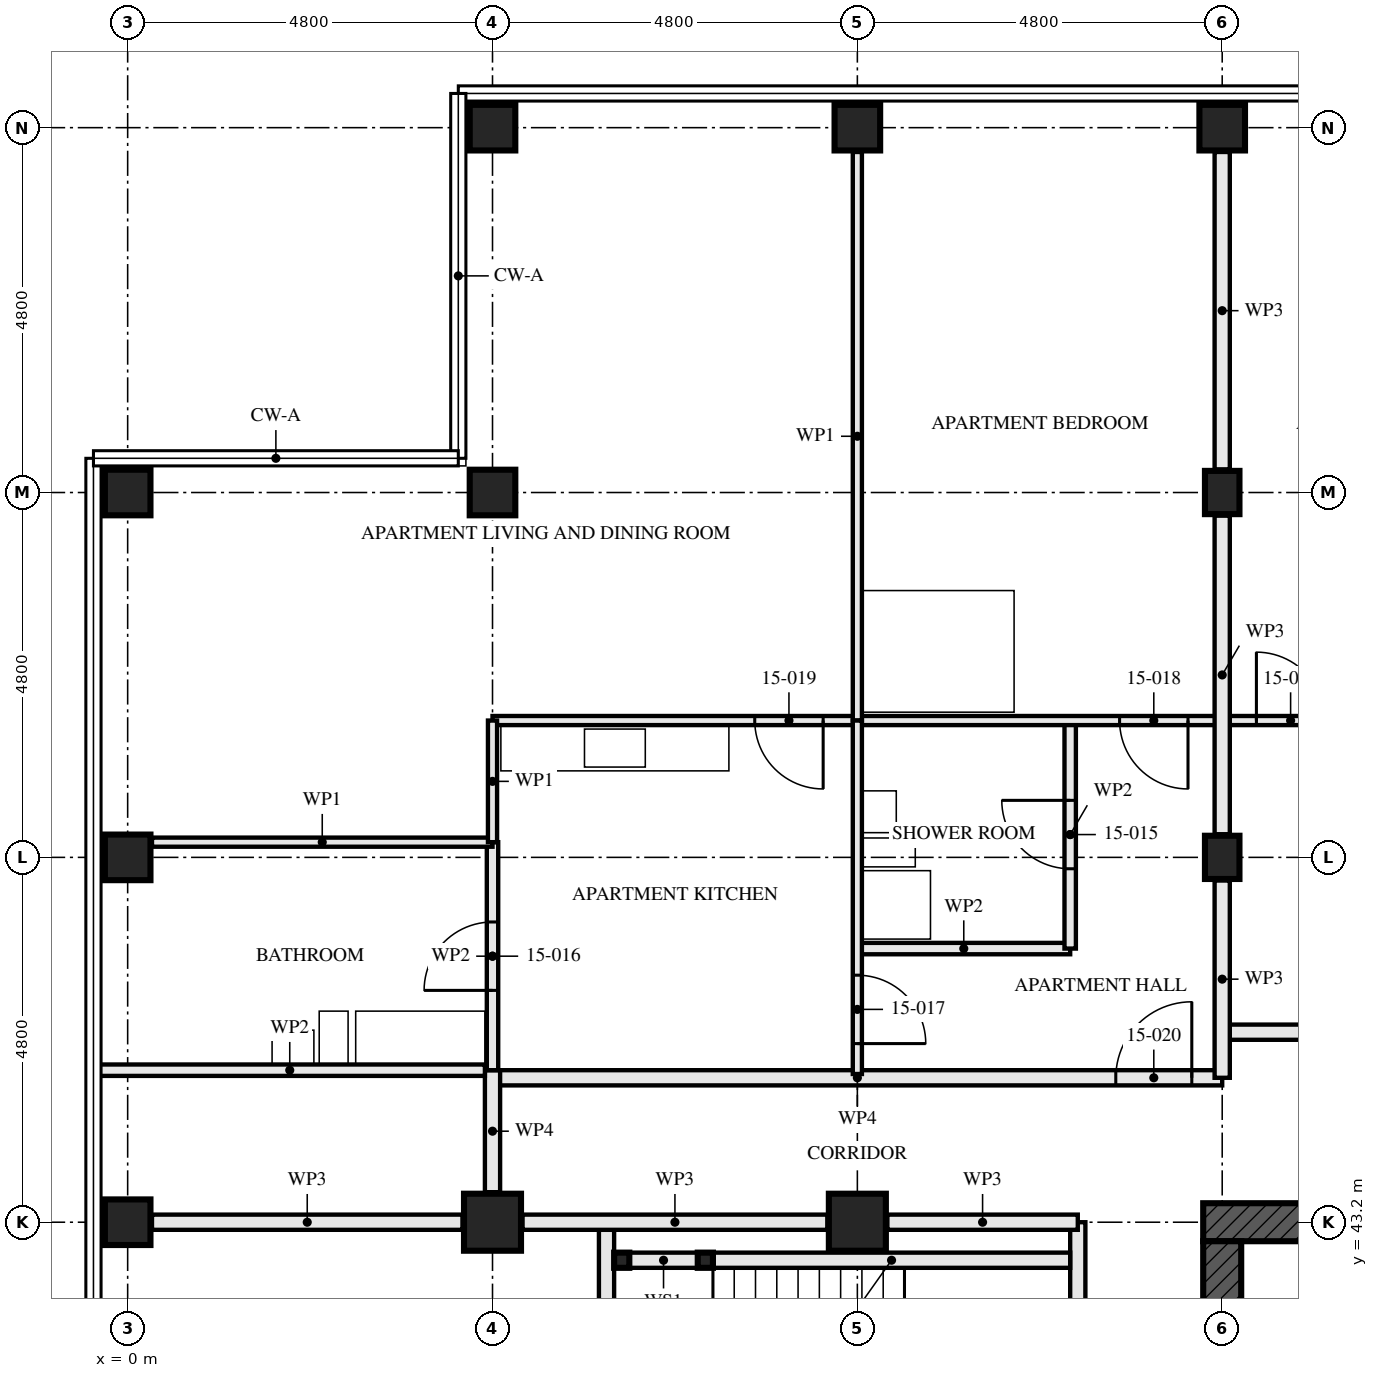
"""IFC4 building model, lengths in metres.
Left out: names, types, materials, properties, quantities, classifications, styles, units other than length and angle.
Written with IfcOpenShell. Run it as: python <this file> out.ifc"""

import sys

from ifc_helpers import new_model, si_unit, direction, frame, frame_2d, origin, origin_2d, place, context, subcontext, project, spatial, rectangle, hollow_rectangle, i_section, extrude, element, fill, save


model = new_model("IFC4")
c1 = context("Model", 3, precision=1e-05, world=origin(), true_north=direction((0.0, 1.0)))
c2 = subcontext(c1, "Body", "Model", "MODEL_VIEW")
j1 = project(units=[si_unit("LENGTHUNIT", "METRE"), si_unit("PLANEANGLEUNIT", "RADIAN")], contexts=[c1])
p1 = place(None, origin())
s1 = spatial("IfcSite", under=j1, at=p1, CompositionType="ELEMENT")
p2 = place(p1, origin())
s2 = spatial("IfcBuilding", under=s1, at=p2, CompositionType="ELEMENT")
p3 = place(p2, frame((0.0, 0.0, 58.5)))
s3 = spatial("IfcBuildingStorey", under=s2, at=p3, CompositionType="ELEMENT", Elevation=58.5)
for number, where, z_axis, x_axis in (
    (1, (0.0, 43.2, 0.0), (0.0, 0.0, 1.0), (0.0, 1.0, 0.0)),
    (2, (0.0, 48.0, 0.0), (0.0, 0.0, 1.0), (1.0, 0.0, 0.0)),
):
    element("IfcColumn", number, at=place(p3, frame(where, z_axis=z_axis, x_axis=x_axis)), inside=s3, PredefinedType="COLUMN", context=c2, shape_type="SweptSolid", body=[
        extrude(hollow_rectangle(XDim=0.6, YDim=0.6, WallThickness=0.08, at=origin_2d()), origin(), (0.0, 0.0, 1.0), 3.5),
    ])
p4 = place(p3, frame((0.0, 52.8, 0.0), z_axis=(0.0, 0.0, 1.0), x_axis=(0.0, 1.0, 0.0)))
e3 = element("IfcColumn", 3, at=p4, inside=s3, PredefinedType="COLUMN", context=c2, shape_type="SweptSolid", body=[
    extrude(hollow_rectangle(XDim=0.6, YDim=0.6, WallThickness=0.06, at=origin_2d()), origin(), (0.0, 0.0, 1.0), 3.5),
])
p5 = place(p3, frame((4.8, 43.2, 0.0), z_axis=(0.0, 0.0, 1.0), x_axis=(0.0, 1.0, 0.0)))
e4 = element("IfcColumn", 4, at=p5, inside=s3, PredefinedType="COLUMN", context=c2, shape_type="SweptSolid", body=[
    extrude(hollow_rectangle(XDim=0.75, YDim=0.75, WallThickness=0.08, at=origin_2d()), origin(), (0.0, 0.0, 1.0), 3.5),
])
for number, where, z_axis, x_axis in (
    (5, (4.8, 52.8, 0.0), (0.0, 0.0, 1.0), (0.0, 1.0, 0.0)),
    (6, (4.8, 57.6, 0.0), (0.0, 0.0, 1.0), (0.0, 1.0, 0.0)),
):
    element("IfcColumn", number, at=place(p3, frame(where, z_axis=z_axis, x_axis=x_axis)), inside=s3, PredefinedType="COLUMN", context=c2, shape_type="SweptSolid", body=[
        extrude(hollow_rectangle(XDim=0.6, YDim=0.6, WallThickness=0.06, at=origin_2d()), origin(), (0.0, 0.0, 1.0), 3.5),
    ])
p6 = place(p3, frame((9.6, 43.2, 0.0), z_axis=(0.0, 0.0, 1.0), x_axis=(0.0, 1.0, 0.0)))
e7 = element("IfcColumn", 7, at=p6, inside=s3, PredefinedType="COLUMN", context=c2, shape_type="SweptSolid", body=[
    extrude(hollow_rectangle(XDim=0.75, YDim=0.75, WallThickness=0.08, at=origin_2d()), origin(), (0.0, 0.0, 1.0), 3.5),
])
p7 = place(p3, frame((9.6, 57.6, 0.0), z_axis=(0.0, 0.0, 1.0), x_axis=(0.0, 1.0, 0.0)))
e8 = element("IfcColumn", 8, at=p7, inside=s3, PredefinedType="COLUMN", context=c2, shape_type="SweptSolid", body=[
    extrude(hollow_rectangle(XDim=0.6, YDim=0.6, WallThickness=0.08, at=origin_2d()), origin(), (0.0, 0.0, 1.0), 3.5),
])
for number, where, z_axis, x_axis in (
    (9, (14.4, 48.0, 0.0), (0.0, 0.0, 1.0), (1.0, 0.0, 0.0)),
    (10, (14.4, 52.8, 0.0), (0.0, 0.0, 1.0), (1.0, 0.0, 0.0)),
):
    element("IfcColumn", number, at=place(p3, frame(where, z_axis=z_axis, x_axis=x_axis)), inside=s3, PredefinedType="COLUMN", context=c2, shape_type="SweptSolid", body=[
        extrude(i_section(OverallWidth=0.454, OverallDepth=0.569, WebThickness=0.078, FlangeThickness=0.125, FilletRadius=0.015, at=origin_2d()), origin(), (0.0, 0.0, 1.0), 3.5),
    ])
p8 = place(p3, frame((14.4, 57.6, 0.0), z_axis=(0.0, 0.0, 1.0), x_axis=(0.0, 1.0, 0.0)))
e11 = element("IfcColumn", 11, at=p8, inside=s3, PredefinedType="COLUMN", context=c2, shape_type="SweptSolid", body=[
    extrude(hollow_rectangle(XDim=0.6, YDim=0.6, WallThickness=0.08, at=origin_2d()), origin(), (0.0, 0.0, 1.0), 3.5),
])
p9 = place(p3, frame((29.05, 43.2, -0.17), z_axis=(0.0, 0.0, 1.0), x_axis=(-1.0, 0.0, 0.0)))
e12 = element("IfcWall", 12, at=p9, inside=s3, PredefinedType="SHEAR", context=c2, shape_type="SweptSolid", body=[
    extrude(rectangle(XDim=14.9, YDim=0.5, at=frame_2d((7.45, 0.0))), origin(), (0.0, 0.0, 1.0), 3.5),
])
p10 = place(p9, frame((6.85, 0.0, 0.17)))
e13 = element("IfcOpeningElement", 13, at=p10, cuts=e12, PredefinedType="OPENING", context=c2, shape_type="SweptSolid", body=[
    extrude(rectangle(XDim=1.2, YDim=2.1, at=frame_2d((0.6, 1.05))), frame((0.0, 0.26, 0.0), z_axis=(0.0, -1.0, 0.0), x_axis=(1.0, 0.0, 0.0)), (0.0, 0.0, 1.0), 0.521),
])
p11 = place(p3, frame((14.4, 42.95, -0.17), z_axis=(0.0, 0.0, 1.0), x_axis=(0.0, -1.0, 0.0)))
e14 = element("IfcWall", 14, at=p11, inside=s3, PredefinedType="SHEAR", context=c2, shape_type="SweptSolid", body=[
    extrude(rectangle(XDim=13.9, YDim=0.5, at=frame_2d((6.95, 0.0))), origin(), (0.0, 0.0, 1.0), 3.5),
])
p12 = place(p11, frame((6.35, 0.0, 0.17)))
e15 = element("IfcOpeningElement", 15, at=p12, cuts=e14, PredefinedType="OPENING", context=c2, shape_type="SweptSolid", body=[
    extrude(rectangle(XDim=1.2, YDim=2.1, at=frame_2d((0.6, 1.05))), frame((0.0, 0.26, 0.0), z_axis=(0.0, -1.0, 0.0), x_axis=(1.0, 0.0, 0.0)), (0.0, 0.0, 1.0), 0.521),
])
for number, where, z_axis, x_axis in (
    (16, (6.5, 42.7, 0.0), (0.0, 0.0, 1.0), (1.0, 0.0, 0.0)),
    (17, (7.6, 42.7, 0.0), (0.0, 0.0, 1.0), (1.0, 0.0, 0.0)),
):
    element("IfcColumn", number, at=place(p3, frame(where, z_axis=z_axis, x_axis=x_axis)), inside=s3, PredefinedType="COLUMN", context=c2, shape_type="SweptSolid", body=[
        extrude(hollow_rectangle(XDim=0.2, YDim=0.2, WallThickness=0.008, at=origin_2d()), origin(), (0.0, 0.0, 1.0), 3.33),
    ])
p13 = place(p3, frame((6.6, 42.7, 0.0), z_axis=(0.0, 0.0, 1.0), x_axis=(1.0, 0.0, 0.0)))
e18 = element("IfcWall", 18, at=p13, inside=s3, PredefinedType="SOLIDWALL", context=c2, shape_type="SweptSolid", body=[
    extrude(rectangle(XDim=0.9, YDim=0.2, at=frame_2d((0.45, 0.0))), origin(), (0.0, 0.0, 1.0), 2.99),
])
p14 = place(p3, frame((7.7, 42.7, 0.0), z_axis=(0.0, 0.0, 1.0), x_axis=(1.0, 0.0, 0.0)))
e19 = element("IfcWall", 19, at=p14, inside=s3, PredefinedType="SOLIDWALL", context=c2, shape_type="SweptSolid", body=[
    extrude(rectangle(XDim=4.7, YDim=0.2, at=frame_2d((2.35, 0.0))), origin(), (0.0, 0.0, 1.0), 2.99),
])
p15 = place(p3, frame((6.3, 43.1, 0.0), z_axis=(0.0, 0.0, 1.0), x_axis=(0.0, -1.0, 0.0)))
e20 = element("IfcWall", 20, at=p15, inside=s3, PredefinedType="SOLIDWALL", context=c2, shape_type="SweptSolid", body=[
    extrude(rectangle(XDim=3.3, YDim=0.2, at=frame_2d((1.65, 0.0))), origin(), (0.0, 0.0, 1.0), 3.33),
])
p16 = place(p3, frame((12.5, 43.2, 0.0), z_axis=(0.0, 0.0, 1.0), x_axis=(0.0, -1.0, 0.0)))
e21 = element("IfcWall", 21, at=p16, inside=s3, PredefinedType="PARTITIONING", context=c2, shape_type="SweptSolid", body=[
    extrude(rectangle(XDim=14.4, YDim=0.2, at=frame_2d((7.2, 0.0))), origin(), (0.0, 0.0, 1.0), 2.55),
])
p17 = place(p16, frame((1.4, 0.0, 0.0)))
e22 = element("IfcOpeningElement", 22, at=p17, cuts=e21, PredefinedType="OPENING", context=c2, shape_type="SweptSolid", body=[
    extrude(rectangle(XDim=1.0, YDim=2.1, at=frame_2d((0.5, 1.05))), frame((0.0, 0.111, 0.0), z_axis=(0.0, -1.0, 0.0), x_axis=(1.0, 0.0, 0.0)), (0.0, 0.0, 1.0), 0.221),
])
p18 = place(p16, frame((10.0, 0.0, 0.0)))
e23 = element("IfcOpeningElement", 23, at=p18, cuts=e21, PredefinedType="OPENING", context=c2, shape_type="SweptSolid", body=[
    extrude(rectangle(XDim=1.0, YDim=2.1, at=frame_2d((0.5, 1.05))), frame((0.0, 0.111, 0.0), z_axis=(0.0, -1.0, 0.0), x_axis=(1.0, 0.0, 0.0)), (0.0, 0.0, 1.0), 0.221),
])
p19 = place(p3, frame((12.4, 49.8, 0.0), z_axis=(0.0, 0.0, 1.0), x_axis=(0.0, -1.0, 0.0)))
e24 = element("IfcWall", 24, at=p19, inside=s3, PredefinedType="PARTITIONING", context=c2, shape_type="SweptSolid", body=[
    extrude(rectangle(XDim=3.0, YDim=0.15, at=frame_2d((1.5, 0.0))), origin(), (0.0, 0.0, 1.0), 2.55),
])
p20 = place(p19, frame((1.05, 0.0, 0.0)))
e25 = element("IfcOpeningElement", 25, at=p20, cuts=e24, PredefinedType="OPENING", context=c2, shape_type="SweptSolid", body=[
    extrude(rectangle(XDim=0.9, YDim=2.1, at=frame_2d((0.45, 1.05))), frame((0.0, 0.085, 0.0), z_axis=(0.0, -1.0, 0.0), x_axis=(1.0, 0.0, 0.0)), (0.0, 0.0, 1.0), 0.171),
])
p21 = place(p3, frame((12.4, 46.8, 0.0), z_axis=(0.0, 0.0, 1.0), x_axis=(-1.0, 0.0, 0.0)))
e26 = element("IfcWall", 26, at=p21, inside=s3, PredefinedType="PARTITIONING", context=c2, shape_type="SweptSolid", body=[
    extrude(rectangle(XDim=2.8, YDim=0.15, at=frame_2d((1.4, 0.0))), origin(), (0.0, 0.0, 1.0), 3.33),
])
p22 = place(p3, frame((4.8, 48.2, 0.0), z_axis=(0.0, 0.0, 1.0), x_axis=(0.0, -1.0, 0.0)))
e27 = element("IfcWall", 27, at=p22, inside=s3, PredefinedType="PARTITIONING", context=c2, shape_type="SweptSolid", body=[
    extrude(rectangle(XDim=3.0, YDim=0.15, at=frame_2d((1.5, 0.0))), origin(), (0.0, 0.0, 1.0), 2.55),
])
p23 = place(p22, frame((1.05, 0.0, 0.0)))
e28 = element("IfcOpeningElement", 28, at=p23, cuts=e27, PredefinedType="OPENING", context=c2, shape_type="SweptSolid", body=[
    extrude(rectangle(XDim=0.9, YDim=2.1, at=frame_2d((0.45, 1.05))), frame((0.0, 0.085, 0.0), z_axis=(0.0, -1.0, 0.0), x_axis=(1.0, 0.0, 0.0)), (0.0, 0.0, 1.0), 0.171),
])
p24 = place(p3, frame((9.6, 49.8, 0.0), z_axis=(0.0, 0.0, 1.0), x_axis=(0.0, -1.0, 0.0)))
e29 = element("IfcWall", 29, at=p24, inside=s3, PredefinedType="PARTITIONING", context=c2, shape_type="SweptSolid", body=[
    extrude(rectangle(XDim=4.65, YDim=0.12, at=frame_2d((2.325, 0.0))), origin(), (0.0, 0.0, 1.0), 2.55),
])
p25 = place(p24, frame((3.35, 0.0, 0.0)))
e30 = element("IfcOpeningElement", 30, at=p25, cuts=e29, PredefinedType="OPENING", context=c2, shape_type="SweptSolid", body=[
    extrude(rectangle(XDim=0.9, YDim=2.1, at=frame_2d((0.45, 1.05))), frame((0.0, 0.071, 0.0), z_axis=(0.0, -1.0, 0.0), x_axis=(1.0, 0.0, 0.0)), (0.0, 0.0, 1.0), 0.141),
])
p26 = place(p3, frame((14.4, 49.8, 0.0), z_axis=(0.0, 0.0, 1.0), x_axis=(-1.0, 0.0, 0.0)))
e31 = element("IfcWall", 31, at=p26, inside=s3, PredefinedType="PARTITIONING", context=c2, shape_type="SweptSolid", body=[
    extrude(rectangle(XDim=4.8, YDim=0.12, at=frame_2d((2.4, 0.0))), origin(), (0.0, 0.0, 1.0), 3.33),
])
p27 = place(p26, frame((0.45, 0.0, 0.0)))
e32 = element("IfcOpeningElement", 32, at=p27, cuts=e31, PredefinedType="OPENING", context=c2, shape_type="SweptSolid", body=[
    extrude(rectangle(XDim=0.9, YDim=2.1, at=frame_2d((0.45, 1.05))), frame((0.0, 0.071, 0.0), z_axis=(0.0, -1.0, 0.0), x_axis=(1.0, 0.0, 0.0)), (0.0, 0.0, 1.0), 0.141),
])
p28 = place(p3, frame((9.6, 49.8, 0.0), z_axis=(0.0, 0.0, 1.0), x_axis=(-1.0, 0.0, 0.0)))
e33 = element("IfcWall", 33, at=p28, inside=s3, PredefinedType="PARTITIONING", context=c2, shape_type="SweptSolid", body=[
    extrude(rectangle(XDim=4.8, YDim=0.12, at=frame_2d((2.4, 0.0))), origin(), (0.0, 0.0, 1.0), 3.33),
])
p29 = place(p28, frame((0.45, 0.0, 0.0)))
e34 = element("IfcOpeningElement", 34, at=p29, cuts=e33, PredefinedType="OPENING", context=c2, shape_type="SweptSolid", body=[
    extrude(rectangle(XDim=0.9, YDim=2.1, at=frame_2d((0.45, 1.05))), frame((0.0, 0.071, 0.0), z_axis=(0.0, -1.0, 0.0), x_axis=(1.0, 0.0, 0.0)), (0.0, 0.0, 1.0), 0.141),
])
p30 = place(p3, frame((4.8, 48.2, 0.0), z_axis=(0.0, 0.0, 1.0), x_axis=(-1.0, 0.0, 0.0)))
e35 = element("IfcWall", 35, at=p30, inside=s3, PredefinedType="PARTITIONING", context=c2, shape_type="SweptSolid", body=[
    extrude(rectangle(XDim=4.48, YDim=0.12, at=frame_2d((2.24, 0.0))), origin(), (0.0, 0.0, 1.0), 3.33),
])
p31 = place(p3, frame((9.6, 57.28, 0.0), z_axis=(0.0, 0.0, 1.0), x_axis=(0.0, -1.0, 0.0)))
e36 = element("IfcWall", 36, at=p31, inside=s3, PredefinedType="PARTITIONING", context=c2, shape_type="SweptSolid", body=[
    extrude(rectangle(XDim=7.48, YDim=0.12, at=frame_2d((3.74, 0.0))), origin(), (0.0, 0.0, 1.0), 2.55),
])
p32 = place(p3, frame((4.8, 49.8, 0.0), z_axis=(0.0, 0.0, 1.0), x_axis=(0.0, -1.0, 0.0)))
e37 = element("IfcWall", 37, at=p32, inside=s3, PredefinedType="PARTITIONING", context=c2, shape_type="SweptSolid", body=[
    extrude(rectangle(XDim=1.6, YDim=0.12, at=frame_2d((0.8, 0.0))), origin(), (0.0, 0.0, 1.0), 3.33),
])
p33 = place(p3, frame((14.4, 45.1, 0.0), z_axis=(0.0, 0.0, 1.0), x_axis=(-1.0, 0.0, 0.0)))
e38 = element("IfcWall", 38, at=p33, inside=s3, PredefinedType="PARTITIONING", context=c2, shape_type="SweptSolid", body=[
    extrude(rectangle(XDim=9.6, YDim=0.2, at=frame_2d((4.8, 0.0))), origin(), (0.0, 0.0, 1.0), 3.33),
])
p34 = place(p33, frame((0.4, 0.0, 0.0)))
e39 = element("IfcOpeningElement", 39, at=p34, cuts=e38, PredefinedType="OPENING", context=c2, shape_type="SweptSolid", body=[
    extrude(rectangle(XDim=1.0, YDim=2.1, at=frame_2d((0.5, 1.05))), frame((0.0, 0.111, 0.0), z_axis=(0.0, -1.0, 0.0), x_axis=(1.0, 0.0, 0.0)), (0.0, 0.0, 1.0), 0.221),
])
p35 = place(p3, frame((4.8, 45.2, 0.0), z_axis=(0.0, 0.0, 1.0), x_axis=(0.0, -1.0, 0.0)))
e40 = element("IfcWall", 40, at=p35, inside=s3, PredefinedType="PARTITIONING", context=c2, shape_type="SweptSolid", body=[
    extrude(rectangle(XDim=1.605, YDim=0.2, at=frame_2d((0.802, 0.0))), origin(), (0.0, 0.0, 1.0), 3.33),
])
p36 = place(p3, frame((19.2, 49.8, 0.0), z_axis=(0.0, 0.0, 1.0), x_axis=(-1.0, 0.0, 0.0)))
e41 = element("IfcWall", 41, at=p36, inside=s3, PredefinedType="PARTITIONING", context=c2, shape_type="SweptSolid", body=[
    extrude(rectangle(XDim=4.8, YDim=0.12, at=frame_2d((2.4, 0.0))), origin(), (0.0, 0.0, 1.0), 3.33),
])
p37 = place(p36, frame((3.45, 0.0, 0.0)))
e42 = element("IfcOpeningElement", 42, at=p37, cuts=e41, PredefinedType="OPENING", context=c2, shape_type="SweptSolid", body=[
    extrude(rectangle(XDim=0.9, YDim=2.1, at=frame_2d((0.45, 1.05))), frame((0.0, 0.071, 0.0), z_axis=(0.0, -1.0, 0.0), x_axis=(1.0, 0.0, 0.0)), (0.0, 0.0, 1.0), 0.141),
])
p38 = place(p3, frame((28.8, 45.7, 0.0), z_axis=(0.0, 0.0, 1.0), x_axis=(-1.0, 0.0, 0.0)))
e43 = element("IfcWall", 43, at=p38, inside=s3, PredefinedType="PARTITIONING", context=c2, shape_type="SweptSolid", body=[
    extrude(rectangle(XDim=14.4, YDim=0.2, at=frame_2d((7.2, 0.0))), origin(), (0.0, 0.0, 1.0), 3.33),
])
p39 = place(p38, frame((0.4, 0.0, 0.0)))
e44 = element("IfcOpeningElement", 44, at=p39, cuts=e43, PredefinedType="OPENING", context=c2, shape_type="SweptSolid", body=[
    extrude(rectangle(XDim=1.0, YDim=2.1, at=frame_2d((0.5, 1.05))), frame((0.0, 0.111, 0.0), z_axis=(0.0, -1.0, 0.0), x_axis=(1.0, 0.0, 0.0)), (0.0, 0.0, 1.0), 0.221),
])
p40 = place(p3, frame((12.5, 43.2, 0.0), z_axis=(0.0, 0.0, 1.0), x_axis=(-1.0, 0.0, 0.0)))
e45 = element("IfcWall", 45, at=p40, inside=s3, PredefinedType="PARTITIONING", context=c2, shape_type="SweptSolid", body=[
    extrude(rectangle(XDim=2.505, YDim=0.2, at=frame_2d((1.252, 0.0))), origin(), (0.0, 0.0, 1.0), 2.32),
])
p41 = place(p3, frame((9.205, 43.2, 0.0), z_axis=(0.0, 0.0, 1.0), x_axis=(-1.0, 0.0, 0.0)))
e46 = element("IfcWall", 46, at=p41, inside=s3, PredefinedType="PARTITIONING", context=c2, shape_type="SweptSolid", body=[
    extrude(rectangle(XDim=4.01, YDim=0.2, at=frame_2d((2.005, 0.0))), origin(), (0.0, 0.0, 1.0), 2.32),
])
p42 = place(p3, frame((4.405, 43.2, 0.0), z_axis=(0.0, 0.0, 1.0), x_axis=(-1.0, 0.0, 0.0)))
e47 = element("IfcWall", 47, at=p42, inside=s3, PredefinedType="PARTITIONING", context=c2, shape_type="SweptSolid", body=[
    extrude(rectangle(XDim=4.085, YDim=0.2, at=frame_2d((2.042, 0.0))), origin(), (0.0, 0.0, 1.0), 2.32),
])
p43 = place(p3, frame((14.4, 45.1, 0.0), z_axis=(0.0, 0.0, 1.0), x_axis=(0.0, 1.0, 0.0)))
e48 = element("IfcWall", 48, at=p43, inside=s3, PredefinedType="PARTITIONING", context=c2, shape_type="SweptSolid", body=[
    extrude(rectangle(XDim=2.595, YDim=0.2, at=frame_2d((1.298, 0.0))), origin(), (0.0, 0.0, 1.0), 2.32),
])
p44 = place(p3, frame((14.4, 48.304, 0.0), z_axis=(0.0, 0.0, 1.0), x_axis=(0.0, 1.0, 0.0)))
e49 = element("IfcWall", 49, at=p44, inside=s3, PredefinedType="PARTITIONING", context=c2, shape_type="SweptSolid", body=[
    extrude(rectangle(XDim=4.191, YDim=0.2, at=frame_2d((2.096, 0.0))), origin(), (0.0, 0.0, 1.0), 2.32),
])
p45 = place(p3, frame((14.4, 53.104, 0.0), z_axis=(0.0, 0.0, 1.0), x_axis=(0.0, 1.0, 0.0)))
e50 = element("IfcWall", 50, at=p45, inside=s3, PredefinedType="PARTITIONING", context=c2, shape_type="SweptSolid", body=[
    extrude(rectangle(XDim=4.176, YDim=0.2, at=frame_2d((2.088, 0.0))), origin(), (0.0, 0.0, 1.0), 2.32),
])
p46 = place(p3, frame((4.7, 45.2, 0.0), z_axis=(0.0, 0.0, 1.0), x_axis=(-1.0, 0.0, 0.0)))
e51 = element("IfcWall", 51, at=p46, inside=s3, PredefinedType="PARTITIONING", context=c2, shape_type="SweptSolid", body=[
    extrude(rectangle(XDim=5.135, YDim=0.15, at=frame_2d((2.567, 0.0))), origin(), (0.0, 0.0, 1.0), 2.32),
])
p47 = place(p20, frame((0.9, 0.0, 0.0), z_axis=(0.0, 0.0, 1.0), x_axis=(-1.0, 0.0, 0.0)))
e52 = element("IfcDoor", 52, at=p47, inside=s3, OperationType="SINGLE_SWING_LEFT", PredefinedType="DOOR", context=c2, shape_type="SweptSolid", body=[
    extrude(rectangle(XDim=0.9, YDim=2.1, at=frame_2d((0.45, 1.05))), frame((0.0, 0.022, 0.0), z_axis=(0.0, -1.0, 0.0), x_axis=(1.0, 0.0, 0.0)), (0.0, 0.0, 1.0), 0.044),
])
fill(e25, e52)
p48 = place(p23, frame((0.9, 0.0, 0.0), z_axis=(0.0, 0.0, 1.0), x_axis=(-1.0, 0.0, 0.0)))
e53 = element("IfcDoor", 53, at=p48, inside=s3, OperationType="SINGLE_SWING_RIGHT", PredefinedType="DOOR", context=c2, shape_type="SweptSolid", body=[
    extrude(rectangle(XDim=0.9, YDim=2.1, at=frame_2d((0.45, 1.05))), frame((0.0, 0.022, 0.0), z_axis=(0.0, -1.0, 0.0), x_axis=(1.0, 0.0, 0.0)), (0.0, 0.0, 1.0), 0.044),
])
fill(e28, e53)
p49 = place(p25, origin())
e54 = element("IfcDoor", 54, at=p49, inside=s3, OperationType="SINGLE_SWING_LEFT", PredefinedType="DOOR", context=c2, shape_type="SweptSolid", body=[
    extrude(rectangle(XDim=0.9, YDim=2.1, at=frame_2d((0.45, 1.05))), frame((0.0, 0.022, 0.0), z_axis=(0.0, -1.0, 0.0), x_axis=(1.0, 0.0, 0.0)), (0.0, 0.0, 1.0), 0.044),
])
fill(e30, e54)
p50 = place(p27, origin())
e55 = element("IfcDoor", 55, at=p50, inside=s3, OperationType="SINGLE_SWING_RIGHT", PredefinedType="DOOR", context=c2, shape_type="SweptSolid", body=[
    extrude(rectangle(XDim=0.9, YDim=2.1, at=frame_2d((0.45, 1.05))), frame((0.0, 0.022, 0.0), z_axis=(0.0, -1.0, 0.0), x_axis=(1.0, 0.0, 0.0)), (0.0, 0.0, 1.0), 0.044),
])
fill(e32, e55)
p51 = place(p29, origin())
e56 = element("IfcDoor", 56, at=p51, inside=s3, OperationType="SINGLE_SWING_RIGHT", PredefinedType="DOOR", context=c2, shape_type="SweptSolid", body=[
    extrude(rectangle(XDim=0.9, YDim=2.1, at=frame_2d((0.45, 1.05))), frame((0.0, 0.022, 0.0), z_axis=(0.0, -1.0, 0.0), x_axis=(1.0, 0.0, 0.0)), (0.0, 0.0, 1.0), 0.044),
])
fill(e34, e56)
p52 = place(p34, frame((1.0, 0.0, 0.0), z_axis=(0.0, 0.0, 1.0), x_axis=(-1.0, 0.0, 0.0)))
e57 = element("IfcDoor", 57, at=p52, inside=s3, OperationType="SINGLE_SWING_LEFT", PredefinedType="DOOR", context=c2, shape_type="SweptSolid", body=[
    extrude(rectangle(XDim=1.0, YDim=2.1, at=frame_2d((0.5, 1.05))), frame((0.0, 0.027, 0.0), z_axis=(0.0, -1.0, 0.0), x_axis=(1.0, 0.0, 0.0)), (0.0, 0.0, 1.0), 0.054),
])
fill(e39, e57)
p53 = place(p37, frame((0.9, 0.0, 0.0), z_axis=(0.0, 0.0, 1.0), x_axis=(-1.0, 0.0, 0.0)))
e58 = element("IfcDoor", 58, at=p53, inside=s3, OperationType="SINGLE_SWING_RIGHT", PredefinedType="DOOR", context=c2, shape_type="SweptSolid", body=[
    extrude(rectangle(XDim=0.9, YDim=2.1, at=frame_2d((0.45, 1.05))), frame((0.0, 0.022, 0.0), z_axis=(0.0, -1.0, 0.0), x_axis=(1.0, 0.0, 0.0)), (0.0, 0.0, 1.0), 0.044),
])
fill(e42, e58)
save(model, sys.argv[1])
